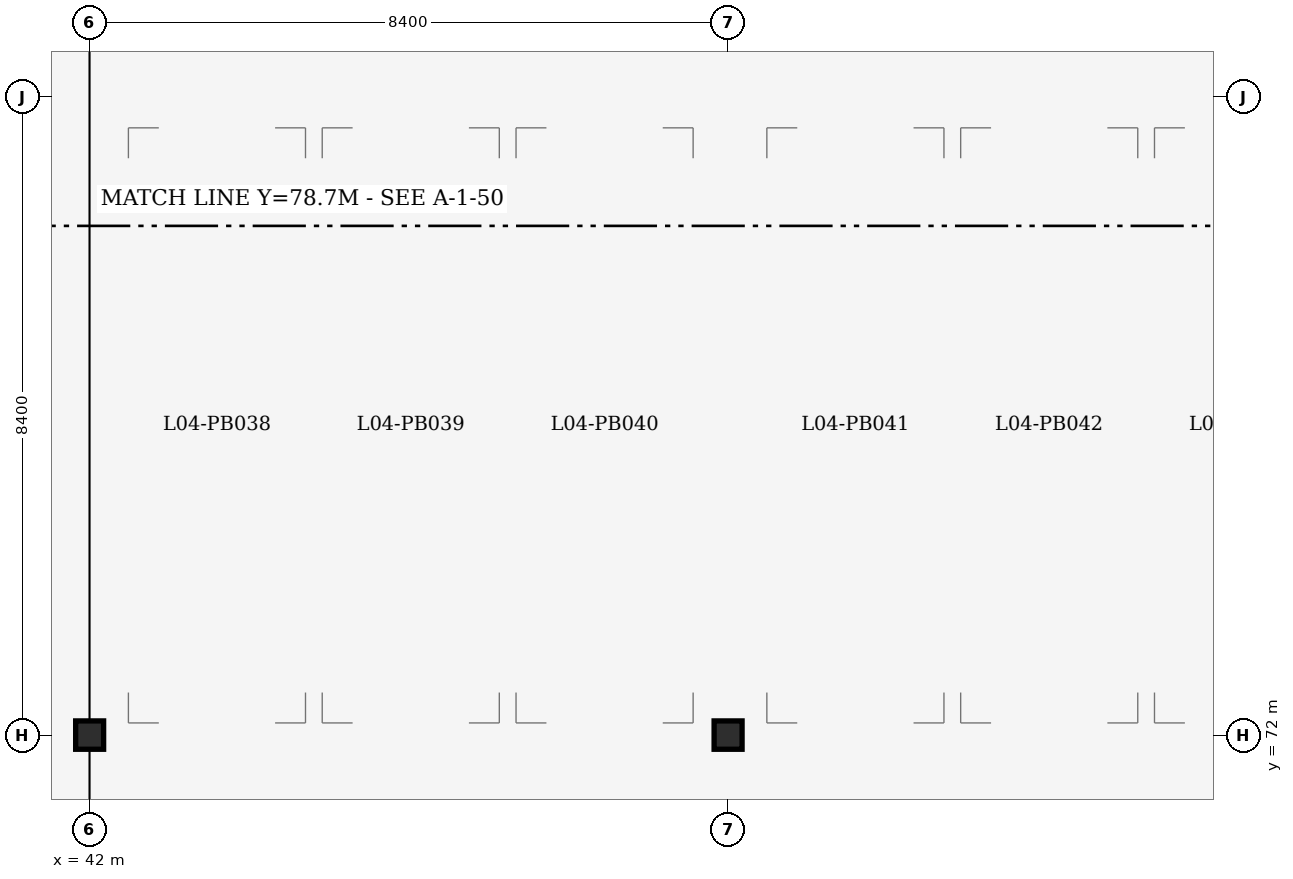
"""IFC4 building model, lengths in metres.
Left out: names, types, materials, properties, quantities, classifications, styles, units other than length and angle.
Written with IfcOpenShell. Run it as: python <this file> out.ifc"""

import sys

from ifc_helpers import new_model, si_unit, direction, frame, origin, origin_2d, place, context, subcontext, project, spatial, i_section, extrude, element, save


model = new_model("IFC4")
c1 = context("Model", 3, precision=1e-05, world=origin(), true_north=direction((0.0, 1.0)))
c2 = subcontext(c1, "Body", "Model", "MODEL_VIEW")
j1 = project(units=[si_unit("LENGTHUNIT", "METRE"), si_unit("PLANEANGLEUNIT", "RADIAN")], contexts=[c1])
p1 = place(None, origin())
s1 = spatial("IfcSite", under=j1, at=p1, CompositionType="ELEMENT")
p2 = place(p1, origin())
s2 = spatial("IfcBuilding", under=s1, at=p2, CompositionType="ELEMENT")
p3 = place(p2, frame((0.0, 0.0, 16.2)))
s3 = spatial("IfcBuildingStorey", under=s2, at=p3, CompositionType="ELEMENT", Elevation=16.2)
for number, where, z_axis, x_axis in (
    (1, (42.0, 72.0, 0.0), (0.0, 0.0, 1.0), (1.0, 0.0, 0.0)),
    (2, (42.0, 80.4, 0.0), (0.0, 0.0, 1.0), (1.0, 0.0, 0.0)),
    (3, (50.4, 72.0, 0.0), (0.0, 0.0, 1.0), (1.0, 0.0, 0.0)),
    (4, (50.4, 80.4, 0.0), (0.0, 0.0, 1.0), (1.0, 0.0, 0.0)),
):
    element("IfcColumn", number, at=place(p3, frame(where, z_axis=z_axis, x_axis=x_axis)), inside=s3, PredefinedType="COLUMN", context=c2, shape_type="SweptSolid", body=[
        extrude(i_section(OverallWidth=0.373, OverallDepth=0.368, WebThickness=0.014, FlangeThickness=0.024, FilletRadius=0.015, at=origin_2d()), origin(), (0.0, 0.0, 1.0), 3.6),
    ])
save(model, sys.argv[1])
